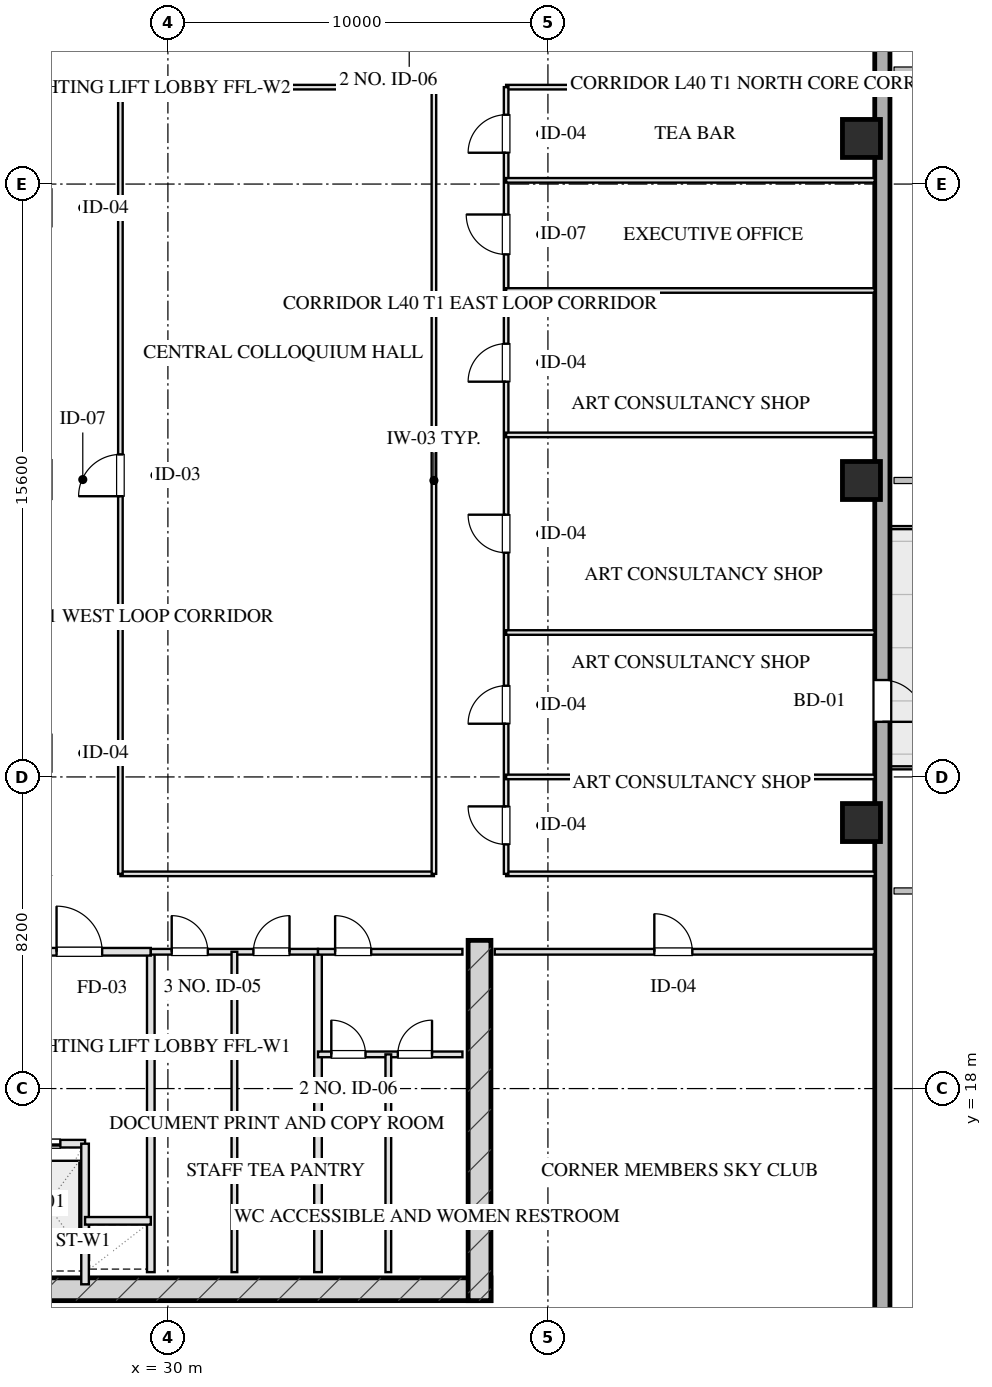
"""IFC4 building model, lengths in metres.
Left out: names, types, materials, properties, quantities, classifications, styles, units other than length and angle.
Written with IfcOpenShell. Run it as: python <this file> out.ifc"""

import sys

from ifc_helpers import new_model, si_unit, direction, frame, frame_2d, origin, origin_2d, place, context, subcontext, project, spatial, rectangle, hollow_rectangle, extrude, element, fill, save


model = new_model("IFC4")
c1 = context("Model", 3, precision=1e-05, world=origin(), true_north=direction((0.0, 1.0)))
c2 = subcontext(c1, "Body", "Model", "MODEL_VIEW")
j1 = project(units=[si_unit("LENGTHUNIT", "METRE"), si_unit("PLANEANGLEUNIT", "RADIAN")], contexts=[c1])
p1 = place(None, origin())
s1 = spatial("IfcSite", under=j1, at=p1, CompositionType="ELEMENT")
p2 = place(p1, origin())
s2 = spatial("IfcBuilding", under=s1, at=p2, CompositionType="ELEMENT")
p3 = place(p2, frame((0.0, 0.0, 152.95)))
s3 = spatial("IfcBuildingStorey", under=s2, at=p3, CompositionType="ELEMENT", Elevation=152.95)
p4 = place(p3, frame((21.5, 12.72, 0.0), z_axis=(0.0, 0.0, 1.0), x_axis=(1.0, 0.0, 0.0)))
e1 = element("IfcWall", 1, at=p4, inside=s3, PredefinedType="SHEAR", context=c2, shape_type="SweptSolid", body=[
    extrude(rectangle(XDim=17.0, YDim=0.6, at=frame_2d((8.5, 0.0))), origin(), (0.0, 0.0, 1.0), 3.45),
])
p5 = place(p3, frame((38.2, 21.9, 0.0), z_axis=(0.0, 0.0, 1.0), x_axis=(0.0, -1.0, 0.0)))
e2 = element("IfcWall", 2, at=p5, inside=s3, PredefinedType="SHEAR", context=c2, shape_type="SweptSolid", body=[
    extrude(rectangle(XDim=9.48, YDim=0.6, at=frame_2d((4.74, 0.0))), origin(), (0.0, 0.0, 1.0), 3.45),
])
for number, where, z_axis, x_axis in (
    (3, (48.25, 25.0, 0.0), (0.0, 0.0, 1.0), (1.0, 0.0, 0.0)),
    (4, (48.25, 34.0, 0.0), (0.0, 0.0, 1.0), (1.0, 0.0, 0.0)),
    (5, (48.25, 43.0, 0.0), (0.0, 0.0, 1.0), (1.0, 0.0, 0.0)),
):
    element("IfcColumn", number, at=place(p3, frame(where, z_axis=z_axis, x_axis=x_axis)), inside=s3, PredefinedType="COLUMN", context=c2, shape_type="SweptSolid", body=[
        extrude(hollow_rectangle(XDim=1.0, YDim=1.0, WallThickness=0.036, at=origin_2d()), origin(), (0.0, 0.0, 1.0), 3.451),
    ])
p6 = place(p3, frame((48.8, 59.0, 0.0), z_axis=(0.0, 0.0, 1.0), x_axis=(0.0, -1.0, 0.0)))
e6 = element("IfcWall", 6, at=p6, inside=s3, PredefinedType="SOLIDWALL", context=c2, shape_type="SweptSolid", body=[
    extrude(rectangle(XDim=50.0, YDim=0.4, at=frame_2d((25.0, 0.0))), origin(), (0.0, 0.0, 1.0), 2.61),
])
p7 = place(p6, frame((30.25, 0.0, 0.0)))
e7 = element("IfcOpeningElement", 7, at=p7, cuts=e6, PredefinedType="OPENING", context=c2, shape_type="SweptSolid", body=[
    extrude(rectangle(XDim=1.1, YDim=2.15, at=frame_2d((0.55, 1.075))), frame((0.0, 0.21, 0.0), z_axis=(0.0, -1.0, 0.0), x_axis=(1.0, 0.0, 0.0)), (0.0, 0.0, 1.0), 0.42),
])
p8 = place(p3, frame((29.55, 21.6, 0.0), z_axis=(0.0, 0.0, 1.0), x_axis=(0.0, -1.0, 0.0)))
e8 = element("IfcWall", 8, at=p8, inside=s3, PredefinedType="PARTITIONING", context=c2, shape_type="SweptSolid", body=[
    extrude(rectangle(XDim=8.43, YDim=0.2, at=frame_2d((4.215, 0.0))), origin(), (0.0, 0.0, 1.0), 3.175),
])
p9 = place(p3, frame((25.72, 21.6, 0.0), z_axis=(0.0, 0.0, 1.0), x_axis=(1.0, 0.0, 0.0)))
e9 = element("IfcWall", 9, at=p9, inside=s3, PredefinedType="PARTITIONING", context=c2, shape_type="SweptSolid", body=[
    extrude(rectangle(XDim=3.83, YDim=0.2, at=frame_2d((1.915, 0.0))), origin(), (0.0, 0.0, 1.0), 3.175),
])
p10 = place(p9, frame((1.35, 0.0, 0.0)))
e10 = element("IfcOpeningElement", 10, at=p10, cuts=e9, PredefinedType="OPENING", context=c2, shape_type="SweptSolid", body=[
    extrude(rectangle(XDim=1.2, YDim=2.05, at=frame_2d((0.6, 1.025))), frame((0.0, 0.11, 0.0), z_axis=(0.0, -1.0, 0.0), x_axis=(1.0, 0.0, 0.0)), (0.0, 0.0, 1.0), 0.22),
])
p11 = place(p3, frame((25.72, 16.55, 0.0), z_axis=(0.0, 0.0, 1.0), x_axis=(1.0, 0.0, 0.0)))
e11 = element("IfcWall", 11, at=p11, inside=s3, PredefinedType="PARTITIONING", context=c2, shape_type="SweptSolid", body=[
    extrude(rectangle(XDim=2.1, YDim=0.2, at=frame_2d((1.05, 0.0))), origin(), (0.0, 0.0, 1.0), 3.175),
])
p12 = place(p11, frame((0.35, 0.0, 0.0)))
e12 = element("IfcOpeningElement", 12, at=p12, cuts=e11, PredefinedType="OPENING", context=c2, shape_type="SweptSolid", body=[
    extrude(rectangle(XDim=1.1, YDim=2.05, at=frame_2d((0.55, 1.025))), frame((0.0, 0.11, 0.0), z_axis=(0.0, -1.0, 0.0), x_axis=(1.0, 0.0, 0.0)), (0.0, 0.0, 1.0), 0.22),
])
p13 = place(p3, frame((27.82, 16.55, 0.0), z_axis=(0.0, 0.0, 1.0), x_axis=(0.0, -1.0, 0.0)))
e13 = element("IfcWall", 13, at=p13, inside=s3, PredefinedType="PARTITIONING", context=c2, shape_type="SweptSolid", body=[
    extrude(rectangle(XDim=3.7, YDim=0.2, at=frame_2d((1.85, 0.0))), origin(), (0.0, 0.0, 1.0), 3.175),
])
p14 = place(p3, frame((27.82, 14.52, 0.0), z_axis=(0.0, 0.0, 1.0), x_axis=(1.0, 0.0, 0.0)))
e14 = element("IfcWall", 14, at=p14, inside=s3, PredefinedType="PARTITIONING", context=c2, shape_type="SweptSolid", body=[
    extrude(rectangle(XDim=1.73, YDim=0.2, at=frame_2d((0.865, 0.0))), origin(), (0.0, 0.0, 1.0), 3.175),
])
p15 = place(p3, frame((33.95, 21.6, 0.0), z_axis=(0.0, 0.0, 1.0), x_axis=(0.0, -1.0, 0.0)))
e15 = element("IfcWall", 15, at=p15, inside=s3, PredefinedType="PARTITIONING", context=c2, shape_type="SweptSolid", body=[
    extrude(rectangle(XDim=8.43, YDim=0.2, at=frame_2d((4.215, 0.0))), origin(), (0.0, 0.0, 1.0), 3.175),
])
p16 = place(p3, frame((29.55, 21.6, 0.0), z_axis=(0.0, 0.0, 1.0), x_axis=(1.0, 0.0, 0.0)))
e16 = element("IfcWall", 16, at=p16, inside=s3, PredefinedType="PARTITIONING", context=c2, shape_type="SweptSolid", body=[
    extrude(rectangle(XDim=4.4, YDim=0.15, at=frame_2d((2.2, 0.0))), origin(), (0.0, 0.0, 1.0), 3.175),
])
p17 = place(p16, frame((0.55, 0.0, 0.0)))
e17 = element("IfcOpeningElement", 17, at=p17, cuts=e16, PredefinedType="OPENING", context=c2, shape_type="SweptSolid", body=[
    extrude(rectangle(XDim=0.95, YDim=2.05, at=frame_2d((0.475, 1.025))), frame((0.0, 0.085, 0.0), z_axis=(0.0, -1.0, 0.0), x_axis=(1.0, 0.0, 0.0)), (0.0, 0.0, 1.0), 0.17),
])
p18 = place(p16, frame((2.7, 0.0, 0.0)))
e18 = element("IfcOpeningElement", 18, at=p18, cuts=e16, PredefinedType="OPENING", context=c2, shape_type="SweptSolid", body=[
    extrude(rectangle(XDim=0.95, YDim=2.05, at=frame_2d((0.475, 1.025))), frame((0.0, 0.085, 0.0), z_axis=(0.0, -1.0, 0.0), x_axis=(1.0, 0.0, 0.0)), (0.0, 0.0, 1.0), 0.17),
])
p19 = place(p3, frame((31.75, 21.6, 0.0), z_axis=(0.0, 0.0, 1.0), x_axis=(0.0, -1.0, 0.0)))
e19 = element("IfcWall", 19, at=p19, inside=s3, PredefinedType="PARTITIONING", context=c2, shape_type="SweptSolid", body=[
    extrude(rectangle(XDim=8.43, YDim=0.15, at=frame_2d((4.215, 0.0))), origin(), (0.0, 0.0, 1.0), 3.175),
])
p20 = place(p3, frame((33.95, 21.6, 0.0), z_axis=(0.0, 0.0, 1.0), x_axis=(1.0, 0.0, 0.0)))
e20 = element("IfcWall", 20, at=p20, inside=s3, PredefinedType="PARTITIONING", context=c2, shape_type="SweptSolid", body=[
    extrude(rectangle(XDim=3.8, YDim=0.15, at=frame_2d((1.9, 0.0))), origin(), (0.0, 0.0, 1.0), 3.175),
])
p21 = place(p20, frame((0.45, 0.0, 0.0)))
e21 = element("IfcOpeningElement", 21, at=p21, cuts=e20, PredefinedType="OPENING", context=c2, shape_type="SweptSolid", body=[
    extrude(rectangle(XDim=0.95, YDim=2.05, at=frame_2d((0.475, 1.025))), frame((0.0, 0.085, 0.0), z_axis=(0.0, -1.0, 0.0), x_axis=(1.0, 0.0, 0.0)), (0.0, 0.0, 1.0), 0.17),
])
p22 = place(p3, frame((33.95, 18.9, 0.0), z_axis=(0.0, 0.0, 1.0), x_axis=(1.0, 0.0, 0.0)))
e22 = element("IfcWall", 22, at=p22, inside=s3, PredefinedType="PARTITIONING", context=c2, shape_type="SweptSolid", body=[
    extrude(rectangle(XDim=3.8, YDim=0.15, at=frame_2d((1.9, 0.0))), origin(), (0.0, 0.0, 1.0), 3.175),
])
p23 = place(p22, frame((0.35, 0.0, 0.0)))
e23 = element("IfcOpeningElement", 23, at=p23, cuts=e22, PredefinedType="OPENING", context=c2, shape_type="SweptSolid", body=[
    extrude(rectangle(XDim=0.9, YDim=2.05, at=frame_2d((0.45, 1.025))), frame((0.0, 0.085, 0.0), z_axis=(0.0, -1.0, 0.0), x_axis=(1.0, 0.0, 0.0)), (0.0, 0.0, 1.0), 0.17),
])
p24 = place(p22, frame((2.1, 0.0, 0.0)))
e24 = element("IfcOpeningElement", 24, at=p24, cuts=e22, PredefinedType="OPENING", context=c2, shape_type="SweptSolid", body=[
    extrude(rectangle(XDim=0.9, YDim=2.05, at=frame_2d((0.45, 1.025))), frame((0.0, 0.085, 0.0), z_axis=(0.0, -1.0, 0.0), x_axis=(1.0, 0.0, 0.0)), (0.0, 0.0, 1.0), 0.17),
])
p25 = place(p3, frame((35.8, 18.9, 0.0), z_axis=(0.0, 0.0, 1.0), x_axis=(0.0, -1.0, 0.0)))
e25 = element("IfcWall", 25, at=p25, inside=s3, PredefinedType="PARTITIONING", context=c2, shape_type="SweptSolid", body=[
    extrude(rectangle(XDim=5.73, YDim=0.15, at=frame_2d((2.865, 0.0))), origin(), (0.0, 0.0, 1.0), 3.175),
])
p26 = place(p3, frame((38.6, 21.6, 0.0), z_axis=(0.0, 0.0, 1.0), x_axis=(1.0, 0.0, 0.0)))
e26 = element("IfcWall", 26, at=p26, inside=s3, PredefinedType="PARTITIONING", context=c2, shape_type="SweptSolid", body=[
    extrude(rectangle(XDim=10.0, YDim=0.15, at=frame_2d((5.0, 0.0))), origin(), (0.0, 0.0, 1.0), 3.175),
])
p27 = place(p26, frame((4.2, 0.0, 0.0)))
e27 = element("IfcOpeningElement", 27, at=p27, cuts=e26, PredefinedType="OPENING", context=c2, shape_type="SweptSolid", body=[
    extrude(rectangle(XDim=1.0, YDim=2.05, at=frame_2d((0.5, 1.025))), frame((0.0, 0.085, 0.0), z_axis=(0.0, -1.0, 0.0), x_axis=(1.0, 0.0, 0.0)), (0.0, 0.0, 1.0), 0.17),
])
p28 = place(p3, frame((28.75, 23.65, 0.0), z_axis=(0.0, 0.0, 1.0), x_axis=(1.0, 0.0, 0.0)))
e28 = element("IfcWall", 28, at=p28, inside=s3, PredefinedType="PARTITIONING", context=c2, shape_type="SweptSolid", body=[
    extrude(rectangle(XDim=8.25, YDim=0.12, at=frame_2d((4.125, 0.0))), origin(), (0.0, 0.0, 1.0), 3.175),
])
p29 = place(p3, frame((38.9, 23.65, 0.0), z_axis=(0.0, 0.0, 1.0), x_axis=(1.0, 0.0, 0.0)))
e29 = element("IfcWall", 29, at=p29, inside=s3, PredefinedType="PARTITIONING", context=c2, shape_type="SweptSolid", body=[
    extrude(rectangle(XDim=9.7, YDim=0.12, at=frame_2d((4.85, 0.0))), origin(), (0.0, 0.0, 1.0), 3.175),
])
p30 = place(p3, frame((28.75, 44.35, 0.0), z_axis=(0.0, 0.0, 1.0), x_axis=(1.0, 0.0, 0.0)))
e30 = element("IfcWall", 30, at=p30, inside=s3, PredefinedType="PARTITIONING", context=c2, shape_type="SweptSolid", body=[
    extrude(rectangle(XDim=8.25, YDim=0.12, at=frame_2d((4.125, 0.0))), origin(), (0.0, 0.0, 1.0), 3.175),
])
p31 = place(p3, frame((38.9, 44.35, 0.0), z_axis=(0.0, 0.0, 1.0), x_axis=(1.0, 0.0, 0.0)))
e31 = element("IfcWall", 31, at=p31, inside=s3, PredefinedType="PARTITIONING", context=c2, shape_type="SweptSolid", body=[
    extrude(rectangle(XDim=9.7, YDim=0.12, at=frame_2d((4.85, 0.0))), origin(), (0.0, 0.0, 1.0), 3.175),
])
p32 = place(p3, frame((28.75, 23.65, 0.0), z_axis=(0.0, 0.0, 1.0), x_axis=(0.0, 1.0, 0.0)))
e32 = element("IfcWall", 32, at=p32, inside=s3, PredefinedType="PARTITIONING", context=c2, shape_type="SweptSolid", body=[
    extrude(rectangle(XDim=20.7, YDim=0.12, at=frame_2d((10.35, 0.0))), origin(), (0.0, 0.0, 1.0), 3.175),
])
p33 = place(p32, frame((9.936, 0.0, 0.0)))
e33 = element("IfcOpeningElement", 33, at=p33, cuts=e32, PredefinedType="OPENING", context=c2, shape_type="SweptSolid", body=[
    extrude(rectangle(XDim=1.1, YDim=2.05, at=frame_2d((0.55, 1.025))), frame((0.0, 0.07, 0.0), z_axis=(0.0, -1.0, 0.0), x_axis=(1.0, 0.0, 0.0)), (0.0, 0.0, 1.0), 0.14),
])
p34 = place(p3, frame((37.0, 23.65, 0.0), z_axis=(0.0, 0.0, 1.0), x_axis=(0.0, 1.0, 0.0)))
e34 = element("IfcWall", 34, at=p34, inside=s3, PredefinedType="PARTITIONING", context=c2, shape_type="SweptSolid", body=[
    extrude(rectangle(XDim=20.7, YDim=0.12, at=frame_2d((10.35, 0.0))), origin(), (0.0, 0.0, 1.0), 3.175),
])
p35 = place(p3, frame((38.9, 23.65, 0.0), z_axis=(0.0, 0.0, 1.0), x_axis=(0.0, 1.0, 0.0)))
e35 = element("IfcWall", 35, at=p35, inside=s3, PredefinedType="PARTITIONING", context=c2, shape_type="SweptSolid", body=[
    extrude(rectangle(XDim=20.7, YDim=0.12, at=frame_2d((10.35, 0.0))), origin(), (0.0, 0.0, 1.0), 3.175),
])
p36 = place(p35, frame((0.775, 0.0, 0.0)))
e36 = element("IfcOpeningElement", 36, at=p36, cuts=e35, PredefinedType="OPENING", context=c2, shape_type="SweptSolid", body=[
    extrude(rectangle(XDim=1.0, YDim=2.05, at=frame_2d((0.5, 1.025))), frame((0.0, 0.07, 0.0), z_axis=(0.0, -1.0, 0.0), x_axis=(1.0, 0.0, 0.0)), (0.0, 0.0, 1.0), 0.14),
])
p37 = place(p35, frame((3.95, 0.0, 0.0)))
e37 = element("IfcOpeningElement", 37, at=p37, cuts=e35, PredefinedType="OPENING", context=c2, shape_type="SweptSolid", body=[
    extrude(rectangle(XDim=1.0, YDim=2.05, at=frame_2d((0.5, 1.025))), frame((0.0, 0.07, 0.0), z_axis=(0.0, -1.0, 0.0), x_axis=(1.0, 0.0, 0.0)), (0.0, 0.0, 1.0), 0.14),
])
p38 = place(p35, frame((8.45, 0.0, 0.0)))
e38 = element("IfcOpeningElement", 38, at=p38, cuts=e35, PredefinedType="OPENING", context=c2, shape_type="SweptSolid", body=[
    extrude(rectangle(XDim=1.0, YDim=2.05, at=frame_2d((0.5, 1.025))), frame((0.0, 0.07, 0.0), z_axis=(0.0, -1.0, 0.0), x_axis=(1.0, 0.0, 0.0)), (0.0, 0.0, 1.0), 0.14),
])
p39 = place(p35, frame((12.95, 0.0, 0.0)))
e39 = element("IfcOpeningElement", 39, at=p39, cuts=e35, PredefinedType="OPENING", context=c2, shape_type="SweptSolid", body=[
    extrude(rectangle(XDim=1.0, YDim=2.05, at=frame_2d((0.5, 1.025))), frame((0.0, 0.07, 0.0), z_axis=(0.0, -1.0, 0.0), x_axis=(1.0, 0.0, 0.0)), (0.0, 0.0, 1.0), 0.14),
])
p40 = place(p35, frame((16.299, 0.0, 0.0)))
e40 = element("IfcOpeningElement", 40, at=p40, cuts=e35, PredefinedType="OPENING", context=c2, shape_type="SweptSolid", body=[
    extrude(rectangle(XDim=1.05, YDim=2.05, at=frame_2d((0.525, 1.025))), frame((0.0, 0.07, 0.0), z_axis=(0.0, -1.0, 0.0), x_axis=(1.0, 0.0, 0.0)), (0.0, 0.0, 1.0), 0.14),
])
p41 = place(p35, frame((18.974, 0.0, 0.0)))
e41 = element("IfcOpeningElement", 41, at=p41, cuts=e35, PredefinedType="OPENING", context=c2, shape_type="SweptSolid", body=[
    extrude(rectangle(XDim=1.0, YDim=2.05, at=frame_2d((0.5, 1.025))), frame((0.0, 0.07, 0.0), z_axis=(0.0, -1.0, 0.0), x_axis=(1.0, 0.0, 0.0)), (0.0, 0.0, 1.0), 0.14),
])
for number, where, z_axis, x_axis in (
    (42, (38.9, 26.2, 0.0), (0.0, 0.0, 1.0), (1.0, 0.0, 0.0)),
    (43, (38.9, 30.0, 0.0), (0.0, 0.0, 1.0), (1.0, 0.0, 0.0)),
    (44, (38.9, 35.2, 0.0), (0.0, 0.0, 1.0), (1.0, 0.0, 0.0)),
    (45, (38.9, 39.0, 0.0), (0.0, 0.0, 1.0), (1.0, 0.0, 0.0)),
    (46, (38.9, 41.898, 0.0), (0.0, 0.0, 1.0), (1.0, 0.0, 0.0)),
):
    element("IfcWall", number, at=place(p3, frame(where, z_axis=z_axis, x_axis=x_axis)), inside=s3, PredefinedType="PARTITIONING", context=c2, shape_type="SweptSolid", body=[
        extrude(rectangle(XDim=9.7, YDim=0.12, at=frame_2d((4.85, 0.0))), origin(), (0.0, 0.0, 1.0), 3.175),
    ])
p42 = place(p7, origin())
e47 = element("IfcDoor", 47, at=p42, inside=s3, OperationType="SINGLE_SWING_RIGHT", PredefinedType="DOOR", context=c2, shape_type="SweptSolid", body=[
    extrude(rectangle(XDim=1.1, YDim=2.15, at=frame_2d((0.55, 1.075))), frame((0.0, 0.025, 0.0), z_axis=(0.0, -1.0, 0.0), x_axis=(1.0, 0.0, 0.0)), (0.0, 0.0, 1.0), 0.05),
])
fill(e7, e47)
p43 = place(p10, origin())
e48 = element("IfcDoor", 48, at=p43, inside=s3, OperationType="SINGLE_SWING_LEFT", PredefinedType="DOOR", context=c2, shape_type="SweptSolid", body=[
    extrude(rectangle(XDim=1.2, YDim=2.05, at=frame_2d((0.6, 1.025))), frame((0.0, 0.025, 0.0), z_axis=(0.0, -1.0, 0.0), x_axis=(1.0, 0.0, 0.0)), (0.0, 0.0, 1.0), 0.05),
])
fill(e10, e48)
p44 = place(p12, origin())
e49 = element("IfcDoor", 49, at=p44, inside=s3, OperationType="DOUBLE_DOOR_SLIDING", PredefinedType="DOOR", context=c2, shape_type="SweptSolid", body=[
    extrude(rectangle(XDim=1.1, YDim=2.05, at=frame_2d((0.55, 1.025))), frame((0.0, 0.025, 0.0), z_axis=(0.0, -1.0, 0.0), x_axis=(1.0, 0.0, 0.0)), (0.0, 0.0, 1.0), 0.05),
])
fill(e12, e49)
p45 = place(p17, origin())
e50 = element("IfcDoor", 50, at=p45, inside=s3, OperationType="SINGLE_SWING_LEFT", PredefinedType="DOOR", context=c2, shape_type="SweptSolid", body=[
    extrude(rectangle(XDim=0.95, YDim=2.05, at=frame_2d((0.475, 1.025))), frame((0.0, 0.025, 0.0), z_axis=(0.0, -1.0, 0.0), x_axis=(1.0, 0.0, 0.0)), (0.0, 0.0, 1.0), 0.05),
])
fill(e17, e50)
p46 = place(p18, origin())
e51 = element("IfcDoor", 51, at=p46, inside=s3, OperationType="SINGLE_SWING_RIGHT", PredefinedType="DOOR", context=c2, shape_type="SweptSolid", body=[
    extrude(rectangle(XDim=0.95, YDim=2.05, at=frame_2d((0.475, 1.025))), frame((0.0, 0.025, 0.0), z_axis=(0.0, -1.0, 0.0), x_axis=(1.0, 0.0, 0.0)), (0.0, 0.0, 1.0), 0.05),
])
fill(e18, e51)
p47 = place(p21, origin())
e52 = element("IfcDoor", 52, at=p47, inside=s3, OperationType="SINGLE_SWING_LEFT", PredefinedType="DOOR", context=c2, shape_type="SweptSolid", body=[
    extrude(rectangle(XDim=0.95, YDim=2.05, at=frame_2d((0.475, 1.025))), frame((0.0, 0.025, 0.0), z_axis=(0.0, -1.0, 0.0), x_axis=(1.0, 0.0, 0.0)), (0.0, 0.0, 1.0), 0.05),
])
fill(e21, e52)
p48 = place(p23, origin())
e53 = element("IfcDoor", 53, at=p48, inside=s3, OperationType="SINGLE_SWING_LEFT", PredefinedType="DOOR", context=c2, shape_type="SweptSolid", body=[
    extrude(rectangle(XDim=0.9, YDim=2.05, at=frame_2d((0.45, 1.025))), frame((0.0, 0.025, 0.0), z_axis=(0.0, -1.0, 0.0), x_axis=(1.0, 0.0, 0.0)), (0.0, 0.0, 1.0), 0.05),
])
fill(e23, e53)
p49 = place(p24, origin())
e54 = element("IfcDoor", 54, at=p49, inside=s3, OperationType="SINGLE_SWING_RIGHT", PredefinedType="DOOR", context=c2, shape_type="SweptSolid", body=[
    extrude(rectangle(XDim=0.9, YDim=2.05, at=frame_2d((0.45, 1.025))), frame((0.0, 0.025, 0.0), z_axis=(0.0, -1.0, 0.0), x_axis=(1.0, 0.0, 0.0)), (0.0, 0.0, 1.0), 0.05),
])
fill(e24, e54)
p50 = place(p27, origin())
e55 = element("IfcDoor", 55, at=p50, inside=s3, OperationType="SINGLE_SWING_LEFT", PredefinedType="DOOR", context=c2, shape_type="SweptSolid", body=[
    extrude(rectangle(XDim=1.0, YDim=2.05, at=frame_2d((0.5, 1.025))), frame((0.0, 0.025, 0.0), z_axis=(0.0, -1.0, 0.0), x_axis=(1.0, 0.0, 0.0)), (0.0, 0.0, 1.0), 0.05),
])
fill(e27, e55)
p51 = place(p33, origin())
e56 = element("IfcDoor", 56, at=p51, inside=s3, OperationType="SINGLE_SWING_LEFT", PredefinedType="DOOR", context=c2, shape_type="SweptSolid", body=[
    extrude(rectangle(XDim=1.1, YDim=2.05, at=frame_2d((0.55, 1.025))), frame((0.0, 0.025, 0.0), z_axis=(0.0, -1.0, 0.0), x_axis=(1.0, 0.0, 0.0)), (0.0, 0.0, 1.0), 0.05),
])
fill(e33, e56)
p52 = place(p36, origin())
e57 = element("IfcDoor", 57, at=p52, inside=s3, OperationType="SINGLE_SWING_RIGHT", PredefinedType="DOOR", context=c2, shape_type="SweptSolid", body=[
    extrude(rectangle(XDim=1.0, YDim=2.05, at=frame_2d((0.5, 1.025))), frame((0.0, 0.025, 0.0), z_axis=(0.0, -1.0, 0.0), x_axis=(1.0, 0.0, 0.0)), (0.0, 0.0, 1.0), 0.05),
])
fill(e36, e57)
p53 = place(p37, origin())
e58 = element("IfcDoor", 58, at=p53, inside=s3, OperationType="SINGLE_SWING_LEFT", PredefinedType="DOOR", context=c2, shape_type="SweptSolid", body=[
    extrude(rectangle(XDim=1.0, YDim=2.05, at=frame_2d((0.5, 1.025))), frame((0.0, 0.025, 0.0), z_axis=(0.0, -1.0, 0.0), x_axis=(1.0, 0.0, 0.0)), (0.0, 0.0, 1.0), 0.05),
])
fill(e37, e58)
p54 = place(p38, origin())
e59 = element("IfcDoor", 59, at=p54, inside=s3, OperationType="SINGLE_SWING_RIGHT", PredefinedType="DOOR", context=c2, shape_type="SweptSolid", body=[
    extrude(rectangle(XDim=1.0, YDim=2.05, at=frame_2d((0.5, 1.025))), frame((0.0, 0.025, 0.0), z_axis=(0.0, -1.0, 0.0), x_axis=(1.0, 0.0, 0.0)), (0.0, 0.0, 1.0), 0.05),
])
fill(e38, e59)
p55 = place(p39, origin())
e60 = element("IfcDoor", 60, at=p55, inside=s3, OperationType="SINGLE_SWING_LEFT", PredefinedType="DOOR", context=c2, shape_type="SweptSolid", body=[
    extrude(rectangle(XDim=1.0, YDim=2.05, at=frame_2d((0.5, 1.025))), frame((0.0, 0.025, 0.0), z_axis=(0.0, -1.0, 0.0), x_axis=(1.0, 0.0, 0.0)), (0.0, 0.0, 1.0), 0.05),
])
fill(e39, e60)
p56 = place(p40, origin())
e61 = element("IfcDoor", 61, at=p56, inside=s3, OperationType="SINGLE_SWING_RIGHT", PredefinedType="DOOR", context=c2, shape_type="SweptSolid", body=[
    extrude(rectangle(XDim=1.05, YDim=2.05, at=frame_2d((0.525, 1.025))), frame((0.0, 0.025, 0.0), z_axis=(0.0, -1.0, 0.0), x_axis=(1.0, 0.0, 0.0)), (0.0, 0.0, 1.0), 0.05),
])
fill(e40, e61)
p57 = place(p41, origin())
e62 = element("IfcDoor", 62, at=p57, inside=s3, OperationType="SINGLE_SWING_LEFT", PredefinedType="DOOR", context=c2, shape_type="SweptSolid", body=[
    extrude(rectangle(XDim=1.0, YDim=2.05, at=frame_2d((0.5, 1.025))), frame((0.0, 0.025, 0.0), z_axis=(0.0, -1.0, 0.0), x_axis=(1.0, 0.0, 0.0)), (0.0, 0.0, 1.0), 0.05),
])
fill(e41, e62)
save(model, sys.argv[1])
